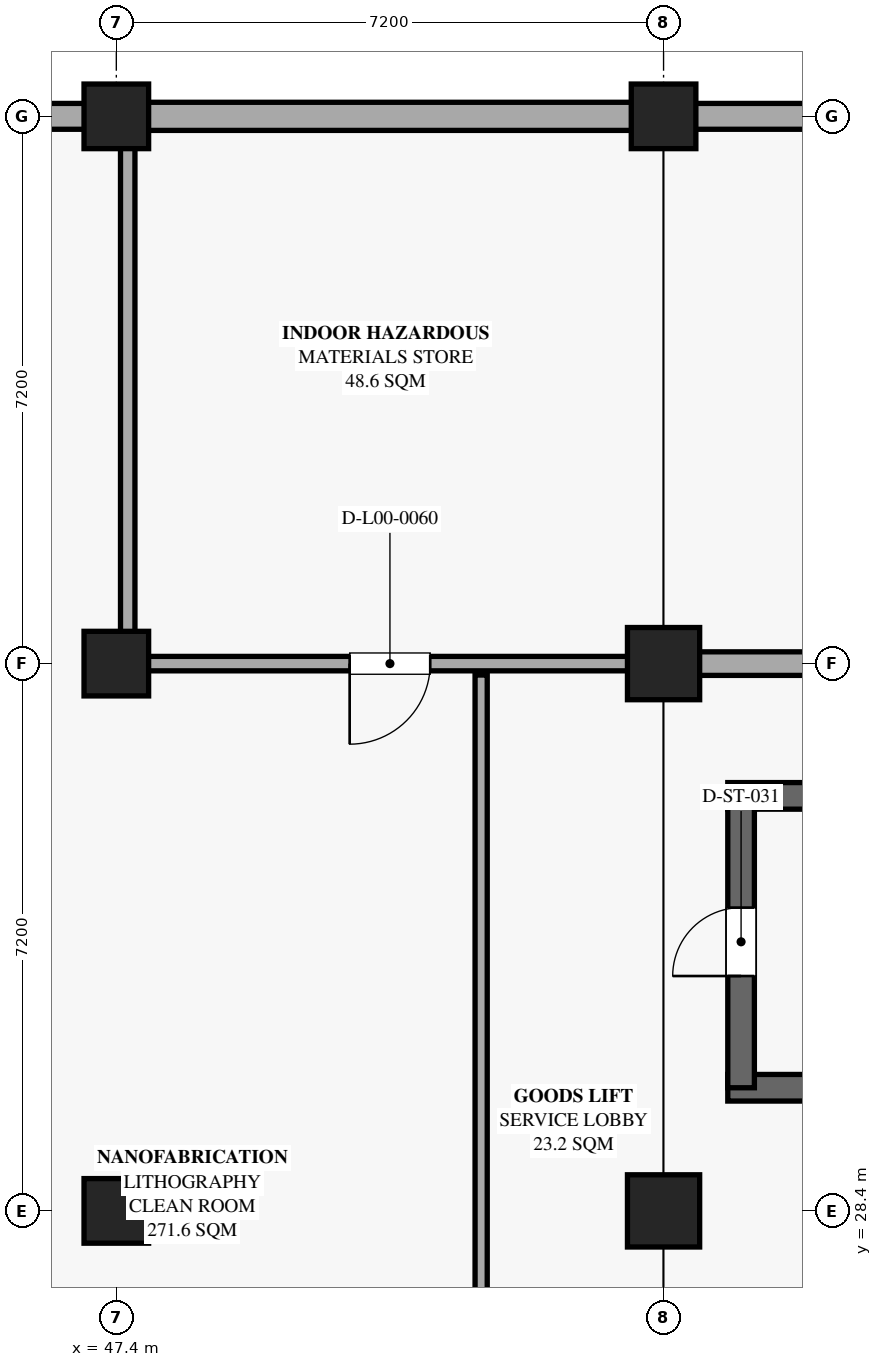
"""IFC4 building model, lengths in metres.
Left out: names, types, materials, properties, quantities, classifications, styles, units other than length and angle.
Written with IfcOpenShell. Run it as: python <this file> out.ifc"""

import sys

from ifc_helpers import new_model, si_unit, direction, frame, frame_2d, origin, origin_2d, place, context, subcontext, project, spatial, rectangle, extrude, element, fill, save


model = new_model("IFC4")
c1 = context("Model", 3, precision=1e-05, world=origin(), true_north=direction((0.0, 1.0)))
c2 = subcontext(c1, "Body", "Model", "MODEL_VIEW")
j1 = project(units=[si_unit("LENGTHUNIT", "METRE"), si_unit("PLANEANGLEUNIT", "RADIAN")], contexts=[c1])
p1 = place(None, origin())
s1 = spatial("IfcSite", under=j1, at=p1, CompositionType="ELEMENT")
p2 = place(p1, origin())
s2 = spatial("IfcBuilding", under=s1, at=p2, CompositionType="ELEMENT")
p3 = place(p2, origin())
s3 = spatial("IfcBuildingStorey", under=s2, at=p3, CompositionType="ELEMENT", Elevation=0.0)
p4 = place(p3, frame((47.4, 28.4, 0.0), z_axis=(0.0, 0.0, 1.0), x_axis=(1.0, 0.0, 0.0)))
e1 = element("IfcColumn", 1, at=p4, inside=s3, PredefinedType="COLUMN", context=c2, shape_type="SweptSolid", body=[
    extrude(rectangle(XDim=0.85, YDim=0.85, at=origin_2d()), origin(), (0.0, 0.0, 1.0), 5.4),
])
p5 = place(p3, frame((54.6, 28.4, 0.0), z_axis=(0.0, 0.0, 1.0), x_axis=(1.0, 0.0, 0.0)))
e2 = element("IfcColumn", 2, at=p5, inside=s3, PredefinedType="COLUMN", context=c2, shape_type="SweptSolid", body=[
    extrude(rectangle(XDim=0.95, YDim=0.95, at=origin_2d()), origin(), (0.0, 0.0, 1.0), 5.4),
])
p6 = place(p3, frame((47.4, 35.6, 0.0), z_axis=(0.0, 0.0, 1.0), x_axis=(1.0, 0.0, 0.0)))
e3 = element("IfcColumn", 3, at=p6, inside=s3, PredefinedType="COLUMN", context=c2, shape_type="SweptSolid", body=[
    extrude(rectangle(XDim=0.85, YDim=0.85, at=origin_2d()), origin(), (0.0, 0.0, 1.0), 5.4),
])
p7 = place(p3, frame((54.6, 35.6, 0.0), z_axis=(0.0, 0.0, 1.0), x_axis=(1.0, 0.0, 0.0)))
e4 = element("IfcColumn", 4, at=p7, inside=s3, PredefinedType="COLUMN", context=c2, shape_type="SweptSolid", body=[
    extrude(rectangle(XDim=0.95, YDim=0.95, at=origin_2d()), origin(), (0.0, 0.0, 1.0), 5.4),
])
for number, where, z_axis, x_axis in (
    (5, (47.4, 42.8, 0.0), (0.0, 0.0, 1.0), (1.0, 0.0, 0.0)),
    (6, (54.6, 42.8, 0.0), (0.0, 0.0, 1.0), (1.0, 0.0, 0.0)),
):
    element("IfcColumn", number, at=place(p3, frame(where, z_axis=z_axis, x_axis=x_axis)), inside=s3, PredefinedType="COLUMN", context=c2, shape_type="SweptSolid", body=[
        extrude(rectangle(XDim=0.85, YDim=0.85, at=origin_2d()), origin(), (0.0, 0.0, 1.0), 5.4),
    ])
p8 = place(p3, frame((40.61, 42.8, 0.0), z_axis=(0.0, 0.0, 1.0), x_axis=(1.0, 0.0, 0.0)))
e7 = element("IfcWall", 7, at=p8, inside=s3, PredefinedType="SOLIDWALL", context=c2, shape_type="SweptSolid", body=[
    extrude(rectangle(XDim=6.38, YDim=0.34, at=frame_2d((3.19, 0.0))), origin(), (0.0, 0.0, 1.0), 3.9),
])
p9 = place(p8, frame((1.49, 0.0, 0.0)))
e8 = element("IfcOpeningElement", 8, at=p9, cuts=e7, PredefinedType="OPENING", context=c2, shape_type="SweptSolid", body=[
    extrude(rectangle(XDim=3.4, YDim=3.4, at=frame_2d((1.7, 1.7))), frame((0.0, 0.18, 0.0), z_axis=(0.0, -1.0, 0.0), x_axis=(1.0, 0.0, 0.0)), (0.0, 0.0, 1.0), 0.36),
])
p10 = place(p3, frame((47.81, 42.8, 0.0), z_axis=(0.0, 0.0, 1.0), x_axis=(1.0, 0.0, 0.0)))
e9 = element("IfcWall", 9, at=p10, inside=s3, PredefinedType="SOLIDWALL", context=c2, shape_type="SweptSolid", body=[
    extrude(rectangle(XDim=6.38, YDim=0.37, at=frame_2d((3.19, 0.0))), origin(), (0.0, 0.0, 1.0), 3.9),
])
p11 = place(p3, frame((55.01, 42.8, 0.0), z_axis=(0.0, 0.0, 1.0), x_axis=(1.0, 0.0, 0.0)))
e10 = element("IfcWall", 10, at=p11, inside=s3, PredefinedType="SOLIDWALL", context=c2, shape_type="SweptSolid", body=[
    extrude(rectangle(XDim=6.355, YDim=0.34, at=frame_2d((3.177, 0.0))), origin(), (0.0, 0.0, 1.0), 3.9),
])
p12 = place(p11, frame((1.478, 0.0, 0.0)))
e11 = element("IfcOpeningElement", 11, at=p12, cuts=e10, PredefinedType="OPENING", context=c2, shape_type="SweptSolid", body=[
    extrude(rectangle(XDim=3.4, YDim=3.4, at=frame_2d((1.7, 1.7))), frame((0.0, 0.18, 0.0), z_axis=(0.0, -1.0, 0.0), x_axis=(1.0, 0.0, 0.0)), (0.0, 0.0, 1.0), 0.36),
])
p13 = place(p3, frame((55.06, 35.6, 0.0), z_axis=(0.0, 0.0, 1.0), x_axis=(1.0, 0.0, 0.0)))
e12 = element("IfcWall", 12, at=p13, inside=s3, PredefinedType="SOLIDWALL", context=c2, shape_type="SweptSolid", body=[
    extrude(rectangle(XDim=6.28, YDim=0.31, at=frame_2d((3.14, 0.0))), origin(), (0.0, 0.0, 1.0), 3.9),
])
p14 = place(p13, frame((2.04, 0.0, 0.9)))
e13 = element("IfcOpeningElement", 13, at=p14, cuts=e12, PredefinedType="OPENING", context=c2, shape_type="SweptSolid", body=[
    extrude(rectangle(XDim=2.2, YDim=2.0, at=frame_2d((1.1, 1.0))), frame((0.0, 0.165, 0.0), z_axis=(0.0, -1.0, 0.0), x_axis=(1.0, 0.0, 0.0)), (0.0, 0.0, 1.0), 0.33),
])
for number, where, z_axis, x_axis in (
    (14, (63.455, 30.02, 0.0), (0.0, 0.0, 1.0), (-1.0, 0.0, 0.0)),
    (15, (55.445, 33.86, 0.0), (0.0, 0.0, 1.0), (1.0, 0.0, 0.0)),
):
    element("IfcWall", number, at=place(p3, frame(where, z_axis=z_axis, x_axis=x_axis)), inside=s3, PredefinedType="SHEAR", context=c2, shape_type="SweptSolid", body=[
        extrude(rectangle(XDim=8.01, YDim=0.35, at=frame_2d((4.005, 0.0))), origin(), (0.0, 0.0, 1.0), 5.13),
    ])
p15 = place(p3, frame((55.62, 30.02, 0.0), z_axis=(0.0, 0.0, 1.0), x_axis=(0.0, 1.0, 0.0)))
e16 = element("IfcWall", 16, at=p15, inside=s3, PredefinedType="SHEAR", context=c2, shape_type="SweptSolid", body=[
    extrude(rectangle(XDim=3.84, YDim=0.35, at=frame_2d((1.92, 0.0))), origin(), (0.0, 0.0, 1.0), 5.13),
])
p16 = place(p15, frame((1.47, 0.0, 0.0)))
e17 = element("IfcOpeningElement", 17, at=p16, cuts=e16, PredefinedType="OPENING", context=c2, shape_type="SweptSolid", body=[
    extrude(rectangle(XDim=0.9, YDim=2.12, at=frame_2d((0.45, 1.06))), frame((0.0, 0.185, 0.0), z_axis=(0.0, -1.0, 0.0), x_axis=(1.0, 0.0, 0.0)), (0.0, 0.0, 1.0), 0.37),
])
p17 = place(p3, frame((54.3, 35.6, 0.0), z_axis=(0.0, 0.0, 1.0), x_axis=(-1.0, 0.0, 0.0)))
e18 = element("IfcWall", 18, at=p17, inside=s3, PredefinedType="PARTITIONING", context=c2, shape_type="SweptSolid", body=[
    extrude(rectangle(XDim=6.6, YDim=0.19, at=frame_2d((3.3, 0.0))), origin(), (0.0, 0.0, 1.0), 3.88),
])
p18 = place(p17, frame((2.77, 0.0, 0.0)))
e19 = element("IfcOpeningElement", 19, at=p18, cuts=e18, PredefinedType="OPENING", context=c2, shape_type="SweptSolid", body=[
    extrude(rectangle(XDim=1.06, YDim=2.12, at=frame_2d((0.53, 1.06))), frame((0.0, 0.105, 0.0), z_axis=(0.0, -1.0, 0.0), x_axis=(1.0, 0.0, 0.0)), (0.0, 0.0, 1.0), 0.21),
])
p19 = place(p3, frame((47.55, 35.75, 0.0), z_axis=(0.0, 0.0, 1.0), x_axis=(0.0, 1.0, 0.0)))
e20 = element("IfcWall", 20, at=p19, inside=s3, PredefinedType="PARTITIONING", context=c2, shape_type="SweptSolid", body=[
    extrude(rectangle(XDim=6.75, YDim=0.19, at=frame_2d((3.375, 0.0))), origin(), (0.0, 0.0, 1.0), 3.88),
])
p20 = place(p3, frame((52.2, 35.45, 0.0), z_axis=(0.0, 0.0, 1.0), x_axis=(0.0, -1.0, 0.0)))
e21 = element("IfcWall", 21, at=p20, inside=s3, PredefinedType="PARTITIONING", context=c2, shape_type="SweptSolid", body=[
    extrude(rectangle(XDim=13.7, YDim=0.16, at=frame_2d((6.85, 0.0))), origin(), (0.0, 0.0, 1.0), 3.88),
])
p21 = place(p16, origin())
e22 = element("IfcDoor", 22, at=p21, inside=s3, OperationType="SINGLE_SWING_LEFT", PredefinedType="DOOR", context=c2, shape_type="SweptSolid", body=[
    extrude(rectangle(XDim=0.9, YDim=2.12, at=frame_2d((0.45, 1.06))), frame((0.0, 0.025, 0.0), z_axis=(0.0, -1.0, 0.0), x_axis=(1.0, 0.0, 0.0)), (0.0, 0.0, 1.0), 0.05),
])
fill(e17, e22)
p22 = place(p18, origin())
e23 = element("IfcDoor", 23, at=p22, inside=s3, OperationType="SINGLE_SWING_RIGHT", PredefinedType="DOOR", context=c2, shape_type="SweptSolid", body=[
    extrude(rectangle(XDim=1.06, YDim=2.12, at=frame_2d((0.53, 1.06))), frame((0.0, 0.025, 0.0), z_axis=(0.0, -1.0, 0.0), x_axis=(1.0, 0.0, 0.0)), (0.0, 0.0, 1.0), 0.05),
])
fill(e19, e23)
save(model, sys.argv[1])
